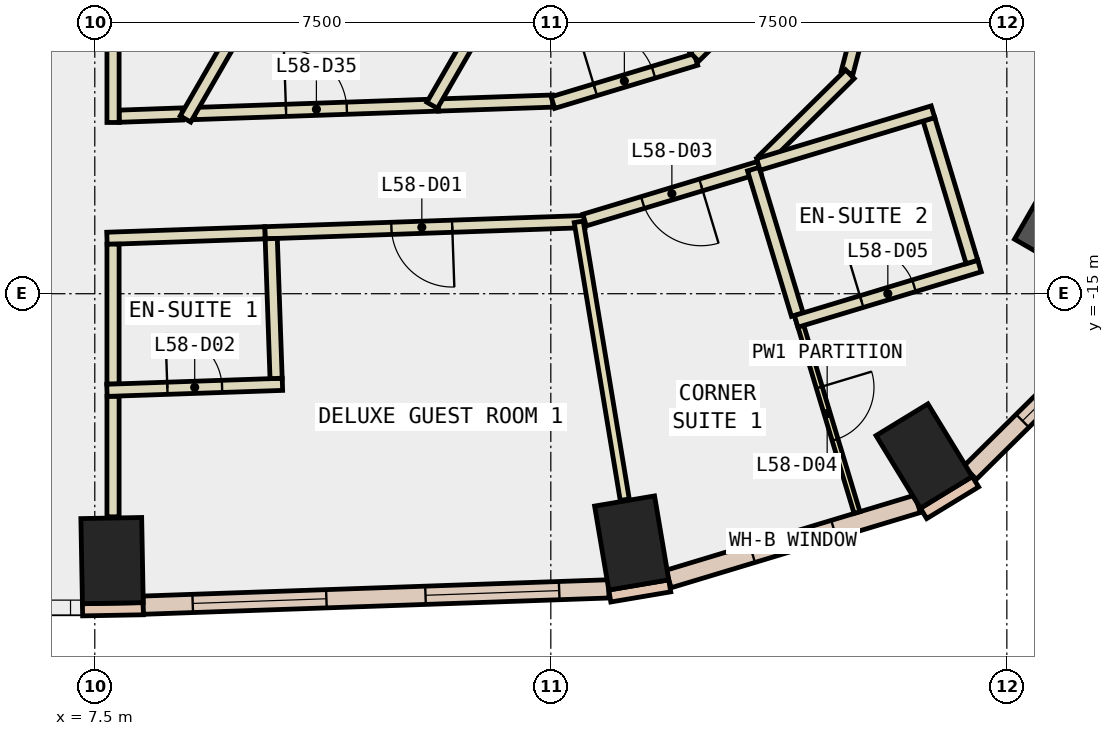
"""IFC4 building model, lengths in metres.
Left out: names, types, materials, properties, quantities, classifications, styles, units other than length and angle.
Written with IfcOpenShell. Run it as: python <this file> out.ifc"""

import sys

from ifc_helpers import new_model, si_unit, direction, frame, frame_2d, origin, origin_2d, place, context, subcontext, project, spatial, rectangle, extrude, element, fill, save


model = new_model("IFC4")
c1 = context("Model", 3, precision=1e-05, world=origin(), true_north=direction((0.0, 1.0)))
c2 = subcontext(c1, "Body", "Model", "MODEL_VIEW")
j1 = project(units=[si_unit("LENGTHUNIT", "METRE"), si_unit("PLANEANGLEUNIT", "RADIAN")], contexts=[c1])
p1 = place(None, origin())
s1 = spatial("IfcSite", under=j1, at=p1, CompositionType="ELEMENT")
p2 = place(p1, origin())
s2 = spatial("IfcBuilding", under=s1, at=p2, CompositionType="ELEMENT")
p3 = place(p2, frame((0.0, 0.0, 255.8)))
s3 = spatial("IfcBuildingStorey", under=s2, at=p3, CompositionType="ELEMENT", Elevation=255.8)
for number, where, z_axis, x_axis in (
    (1, (7.784, -19.389, -0.34), (0.0, 0.0, 1.0), (1.0, 0.018, 0.0)),
    (2, (16.33, -19.099, -0.34), (0.0, 0.0, 1.0), (0.986, 0.167, 0.0)),
    (3, (21.14, -17.67, -0.34), (0.0, 0.0, 1.0), (0.853, 0.521, 0.0)),
):
    element("IfcColumn", number, at=place(p3, frame(where, z_axis=z_axis, x_axis=x_axis)), inside=s3, PredefinedType="COLUMN", context=c2, shape_type="SweptSolid", body=[
        extrude(rectangle(XDim=1.0, YDim=1.4, at=origin_2d()), origin(), (0.0, 0.0, 1.0), 3.6),
    ])
p4 = place(p3, frame((23.856, -13.774, -0.34), z_axis=(0.0, 0.0, 1.0), x_axis=(-0.866025403784, 0.5, 0.0)))
e4 = element("IfcColumn", 4, at=p4, inside=s3, PredefinedType="COLUMN", context=c2, shape_type="SweptSolid", body=[
    extrude(rectangle(XDim=1.8, YDim=1.8, at=origin_2d()), origin(), (0.0, 0.0, 1.0), 3.6),
])
for number, where, z_axis, x_axis in (
    (5, (7.298, -20.198, 0.0), (0.0, 0.0, 1.0), (1.0, 0.018, 0.0)),
    (6, (15.97, -19.971, 0.0), (0.0, 0.0, 1.0), (0.986, 0.167, 0.0)),
):
    element("IfcWall", number, at=place(p3, frame(where, z_axis=z_axis, x_axis=x_axis)), inside=s3, PredefinedType="STANDARD", context=c2, shape_type="SweptSolid", body=[
        extrude(rectangle(XDim=1.0, YDim=0.2, at=frame_2d((0.5, 0.0))), origin(), (0.0, 0.0, 1.0), 3.26),
    ])
p5 = place(p3, frame((21.13, -18.613, 0.0), z_axis=(0.0, 0.0, 1.0), x_axis=(0.853679739553, 0.520798331677, 0.0)))
e7 = element("IfcWall", 7, at=p5, inside=s3, PredefinedType="STANDARD", context=c2, shape_type="SweptSolid", body=[
    extrude(rectangle(XDim=1.0, YDim=0.2, at=frame_2d((0.5, 0.0))), origin(), (0.0, 0.0, 1.0), 3.26),
])
p6 = place(p3, frame((8.296, -20.122, 0.0), z_axis=(0.0, 0.0, 1.0), x_axis=(0.999387577449, 0.034992428331, 0.0)))
e8 = element("IfcWall", 8, at=p6, inside=s3, PredefinedType="STANDARD", context=c2, shape_type="SweptSolid", body=[
    extrude(rectangle(XDim=7.661, YDim=0.3, at=frame_2d((3.83, 0.0))), origin(), (0.0, 0.0, 1.0), 3.26),
])
p7 = place(p6, frame((0.815, 0.0, 0.9)))
e9 = element("IfcOpeningElement", 9, at=p7, cuts=e8, PredefinedType="OPENING", context=c2, shape_type="SweptSolid", body=[
    extrude(rectangle(XDim=2.2, YDim=2.0, at=frame_2d((1.1, 1.0))), frame((0.0, 0.16, 0.0), z_axis=(0.0, -1.0, 0.0), x_axis=(1.0, 0.0, 0.0)), (0.0, 0.0, 1.0), 0.32),
])
p8 = place(p6, frame((4.646, 0.0, 0.9)))
e10 = element("IfcOpeningElement", 10, at=p8, cuts=e8, PredefinedType="OPENING", context=c2, shape_type="SweptSolid", body=[
    extrude(rectangle(XDim=2.2, YDim=2.0, at=frame_2d((1.1, 1.0))), frame((0.0, 0.16, 0.0), z_axis=(0.0, -1.0, 0.0), x_axis=(1.0, 0.0, 0.0)), (0.0, 0.0, 1.0), 0.32),
])
p9 = place(p3, frame((16.936, -19.692, 0.0), z_axis=(0.0, 0.0, 1.0), x_axis=(0.957346168713, 0.288943442997, 0.0)))
e11 = element("IfcWall", 11, at=p9, inside=s3, PredefinedType="STANDARD", context=c2, shape_type="SweptSolid", body=[
    extrude(rectangle(XDim=4.281, YDim=0.3, at=frame_2d((2.14, 0.0))), origin(), (0.0, 0.0, 1.0), 3.26),
])
p10 = place(p9, frame((1.44, 0.0, 0.9)))
e12 = element("IfcOpeningElement", 12, at=p10, cuts=e11, PredefinedType="OPENING", context=c2, shape_type="SweptSolid", body=[
    extrude(rectangle(XDim=1.4, YDim=2.0, at=frame_2d((0.7, 1.0))), frame((0.0, 0.16, 0.0), z_axis=(0.0, -1.0, 0.0), x_axis=(1.0, 0.0, 0.0)), (0.0, 0.0, 1.0), 0.32),
])
p11 = place(p3, frame((21.893, -17.946, 0.0), z_axis=(0.0, 0.0, 1.0), x_axis=(0.71110935557, 0.703081420904, 0.0)))
e13 = element("IfcWall", 13, at=p11, inside=s3, PredefinedType="STANDARD", context=c2, shape_type="SweptSolid", body=[
    extrude(rectangle(XDim=3.832, YDim=0.3, at=frame_2d((1.916, 0.0))), origin(), (0.0, 0.0, 1.0), 3.26),
])
p12 = place(p11, frame((1.216, 0.0, 0.9)))
e14 = element("IfcOpeningElement", 14, at=p12, cuts=e13, PredefinedType="OPENING", context=c2, shape_type="SweptSolid", body=[
    extrude(rectangle(XDim=1.4, YDim=2.0, at=frame_2d((0.7, 1.0))), frame((0.0, 0.16, 0.0), z_axis=(0.0, -1.0, 0.0), x_axis=(1.0, 0.0, 0.0)), (0.0, 0.0, 1.0), 0.32),
])
p13 = place(p3, frame((7.9, -12.081, 0.0), z_axis=(0.0, 0.0, 1.0), x_axis=(0.999365240621, 0.035624652105, 0.0)))
e15 = element("IfcWall", 15, at=p13, inside=s3, PredefinedType="PARTITIONING", context=c2, shape_type="SweptSolid", body=[
    extrude(rectangle(XDim=1.042, YDim=0.2, at=frame_2d((0.521, 0.0))), origin(), (0.0, 0.0, 1.0), 3.26),
])
p14 = place(p3, frame((9.141, -12.037, 0.0), z_axis=(0.0, 0.0, 1.0), x_axis=(0.999388955878, 0.034953038062, 0.0)))
e16 = element("IfcWall", 16, at=p14, inside=s3, PredefinedType="PARTITIONING", context=c2, shape_type="SweptSolid", body=[
    extrude(rectangle(XDim=4.009, YDim=0.2, at=frame_2d((2.005, 0.0))), origin(), (0.0, 0.0, 1.0), 3.26),
])
p15 = place(p14, frame((1.505, 0.0, 0.0)))
e17 = element("IfcOpeningElement", 17, at=p15, cuts=e16, PredefinedType="OPENING", context=c2, shape_type="SweptSolid", body=[
    extrude(rectangle(XDim=1.0, YDim=2.1, at=frame_2d((0.5, 1.05))), frame((0.0, 0.11, 0.0), z_axis=(0.0, -1.0, 0.0), x_axis=(1.0, 0.0, 0.0)), (0.0, 0.0, 1.0), 0.22),
])
p16 = place(p3, frame((13.148, -11.897, 0.0), z_axis=(0.0, 0.0, 1.0), x_axis=(0.999405229262, 0.034484601243, 0.0)))
e18 = element("IfcWall", 18, at=p16, inside=s3, PredefinedType="PARTITIONING", context=c2, shape_type="SweptSolid", body=[
    extrude(rectangle(XDim=1.883, YDim=0.2, at=frame_2d((0.942, 0.0))), origin(), (0.0, 0.0, 1.0), 3.26),
])
p17 = place(p3, frame((15.034, -11.857, 0.0), z_axis=(0.0, 0.0, 1.0), x_axis=(0.957338084933, 0.288970225346, 0.0)))
e19 = element("IfcWall", 19, at=p17, inside=s3, PredefinedType="PARTITIONING", context=c2, shape_type="SweptSolid", body=[
    extrude(rectangle(XDim=2.457, YDim=0.2, at=frame_2d((1.229, 0.0))), origin(), (0.0, 0.0, 1.0), 3.26),
])
p18 = place(p17, frame((0.728, 0.0, 0.0)))
e20 = element("IfcOpeningElement", 20, at=p18, cuts=e19, PredefinedType="OPENING", context=c2, shape_type="SweptSolid", body=[
    extrude(rectangle(XDim=1.0, YDim=2.1, at=frame_2d((0.5, 1.05))), frame((0.0, 0.11, 0.0), z_axis=(0.0, -1.0, 0.0), x_axis=(1.0, 0.0, 0.0)), (0.0, 0.0, 1.0), 0.22),
])
p19 = place(p3, frame((17.362, -11.106, 0.0), z_axis=(0.0, 0.0, 1.0), x_axis=(0.710859741153, 0.703333795866, 0.0)))
e21 = element("IfcWall", 21, at=p19, inside=s3, PredefinedType="PARTITIONING", context=c2, shape_type="SweptSolid", body=[
    extrude(rectangle(XDim=1.071, YDim=0.2, at=frame_2d((0.535, 0.0))), origin(), (0.0, 0.0, 1.0), 3.26),
])
p20 = place(p3, frame((15.559, -13.814, 0.0), z_axis=(0.0, 0.0, 1.0), x_axis=(-0.999388410674, -0.034968623214, 0.0)))
e22 = element("IfcWall", 22, at=p20, inside=s3, PredefinedType="PARTITIONING", context=c2, shape_type="SweptSolid", body=[
    extrude(rectangle(XDim=5.264, YDim=0.2, at=frame_2d((2.632, 0.0))), origin(), (0.0, 0.0, 1.0), 3.26),
])
p21 = place(p20, frame((2.182, 0.0, 0.0)))
e23 = element("IfcOpeningElement", 23, at=p21, cuts=e22, PredefinedType="OPENING", context=c2, shape_type="SweptSolid", body=[
    extrude(rectangle(XDim=1.0, YDim=2.1, at=frame_2d((0.5, 1.05))), frame((0.0, 0.11, 0.0), z_axis=(0.0, -1.0, 0.0), x_axis=(1.0, 0.0, 0.0)), (0.0, 0.0, 1.0), 0.22),
])
p22 = place(p3, frame((10.298, -13.998, 0.0), z_axis=(0.0, 0.0, 1.0), x_axis=(-0.999386321032, -0.035028293342, 0.0)))
e24 = element("IfcWall", 24, at=p22, inside=s3, PredefinedType="PARTITIONING", context=c2, shape_type="SweptSolid", body=[
    extrude(rectangle(XDim=2.6, YDim=0.2, at=frame_2d((1.3, 0.0))), origin(), (0.0, 0.0, 1.0), 3.26),
])
p23 = place(p3, frame((18.427, -12.922, 0.0), z_axis=(0.0, 0.0, 1.0), x_axis=(-0.957336631432, -0.288975040651, 0.0)))
e25 = element("IfcWall", 25, at=p23, inside=s3, PredefinedType="PARTITIONING", context=c2, shape_type="SweptSolid", body=[
    extrude(rectangle(XDim=3.0, YDim=0.2, at=frame_2d((1.5, 0.0))), origin(), (0.0, 0.0, 1.0), 3.26),
])
p24 = place(p23, frame((1.0, 0.0, 0.0)))
e26 = element("IfcOpeningElement", 26, at=p24, cuts=e25, PredefinedType="OPENING", context=c2, shape_type="SweptSolid", body=[
    extrude(rectangle(XDim=1.0, YDim=2.1, at=frame_2d((0.5, 1.05))), frame((0.0, 0.11, 0.0), z_axis=(0.0, -1.0, 0.0), x_axis=(1.0, 0.0, 0.0)), (0.0, 0.0, 1.0), 0.22),
])
p25 = place(p3, frame((20.327, -9.629, 0.0), z_axis=(0.0, 0.0, 1.0), x_axis=(-0.253192482031, -0.967415922467, 0.0)))
e27 = element("IfcWall", 27, at=p25, inside=s3, PredefinedType="PARTITIONING", context=c2, shape_type="SweptSolid", body=[
    extrude(rectangle(XDim=1.792, YDim=0.2, at=frame_2d((0.896, 0.0))), origin(), (0.0, 0.0, 1.0), 3.26),
])
p26 = place(p3, frame((19.919, -11.39, 0.0), z_axis=(0.0, 0.0, 1.0), x_axis=(-0.71104667794, -0.70314480855, 0.0)))
e28 = element("IfcWall", 28, at=p26, inside=s3, PredefinedType="PARTITIONING", context=c2, shape_type="SweptSolid", body=[
    extrude(rectangle(XDim=2.008, YDim=0.2, at=frame_2d((1.004, 0.0))), origin(), (0.0, 0.0, 1.0), 3.26),
])
p27 = place(p3, frame((7.8, -7.499, 0.0), z_axis=(0.0, 0.0, 1.0), x_axis=(0.0, -1.0, 0.0)))
e29 = element("IfcWall", 29, at=p27, inside=s3, PredefinedType="PARTITIONING", context=c2, shape_type="SweptSolid", body=[
    extrude(rectangle(XDim=4.685, YDim=0.2, at=frame_2d((2.343, 0.0))), origin(), (0.0, 0.0, 1.0), 3.26),
])
p28 = place(p27, frame((1.842, 0.0, 0.0)))
e30 = element("IfcOpeningElement", 30, at=p28, cuts=e29, PredefinedType="OPENING", context=c2, shape_type="SweptSolid", body=[
    extrude(rectangle(XDim=1.0, YDim=2.1, at=frame_2d((0.5, 1.05))), frame((0.0, 0.11, 0.0), z_axis=(0.0, -1.0, 0.0), x_axis=(1.0, 0.0, 0.0)), (0.0, 0.0, 1.0), 0.22),
])
p29 = place(p3, frame((7.8, -16.686, 0.0), z_axis=(0.0, 0.0, 1.0), x_axis=(0.0, -1.0, 0.0)))
e31 = element("IfcWall", 31, at=p29, inside=s3, PredefinedType="PARTITIONING", context=c2, shape_type="SweptSolid", body=[
    extrude(rectangle(XDim=1.983, YDim=0.2, at=frame_2d((0.991, 0.0))), origin(), (0.0, 0.0, 1.0), 3.26),
])
p30 = place(p3, frame((7.8, -14.185, 0.0), z_axis=(0.0, 0.0, 1.0), x_axis=(0.0, -1.0, 0.0)))
e32 = element("IfcWall", 32, at=p30, inside=s3, PredefinedType="PARTITIONING", context=c2, shape_type="SweptSolid", body=[
    extrude(rectangle(XDim=2.301, YDim=0.2, at=frame_2d((1.15, 0.0))), origin(), (0.0, 0.0, 1.0), 3.26),
])
p31 = place(p3, frame((11.794, -7.271, 0.0), z_axis=(0.0, 0.0, 1.0), x_axis=(-0.499918457185, -0.866072477433, 0.0)))
e33 = element("IfcWall", 33, at=p31, inside=s3, PredefinedType="PARTITIONING", context=c2, shape_type="SweptSolid", body=[
    extrude(rectangle(XDim=5.607, YDim=0.2, at=frame_2d((2.803, 0.0))), origin(), (0.0, 0.0, 1.0), 3.26),
])
p32 = place(p3, frame((14.739, -8.972, 0.0), z_axis=(0.0, 0.0, 1.0), x_axis=(-0.499974489635, -0.8660401317, 0.0)))
e34 = element("IfcWall", 34, at=p32, inside=s3, PredefinedType="PARTITIONING", context=c2, shape_type="SweptSolid", body=[
    extrude(rectangle(XDim=3.382, YDim=0.2, at=frame_2d((1.691, 0.0))), origin(), (0.0, 0.0, 1.0), 3.26),
])
p33 = place(p3, frame((7.7, -16.589, 0.0), z_axis=(0.0, 0.0, 1.0), x_axis=(0.999410709261, 0.034325416459, 0.0)))
e35 = element("IfcWall", 35, at=p33, inside=s3, PredefinedType="PARTITIONING", context=c2, shape_type="SweptSolid", body=[
    extrude(rectangle(XDim=2.888, YDim=0.2, at=frame_2d((1.444, 0.0))), origin(), (0.0, 0.0, 1.0), 3.26),
])
p34 = place(p33, frame((0.994, 0.0, 0.0)))
e36 = element("IfcOpeningElement", 36, at=p34, cuts=e35, PredefinedType="OPENING", context=c2, shape_type="SweptSolid", body=[
    extrude(rectangle(XDim=0.9, YDim=2.1, at=frame_2d((0.45, 1.05))), frame((0.0, 0.11, 0.0), z_axis=(0.0, -1.0, 0.0), x_axis=(1.0, 0.0, 0.0)), (0.0, 0.0, 1.0), 0.22),
])
p35 = place(p3, frame((10.482, -16.393, 0.0), z_axis=(0.0, 0.0, 1.0), x_axis=(-0.034703518322, 0.999397651496, 0.0)))
e37 = element("IfcWall", 37, at=p35, inside=s3, PredefinedType="PARTITIONING", context=c2, shape_type="SweptSolid", body=[
    extrude(rectangle(XDim=2.301, YDim=0.2, at=frame_2d((1.15, 0.0))), origin(), (0.0, 0.0, 1.0), 3.26),
])
p36 = place(p3, frame((15.459, -13.818, 0.0), z_axis=(0.0, 0.0, 1.0), x_axis=(0.163441652939, -0.986553002167, 0.0)))
e38 = element("IfcWall", 38, at=p36, inside=s3, PredefinedType="PARTITIONING", context=c2, shape_type="SweptSolid", body=[
    extrude(rectangle(XDim=4.632, YDim=0.15, at=frame_2d((2.316, 0.0))), origin(), (0.0, 0.0, 1.0), 3.26),
])
p37 = place(p3, frame((19.054, -15.344, 0.0), z_axis=(0.0, 0.0, 1.0), x_axis=(0.288803435252, -0.957388414274, 0.0)))
e39 = element("IfcWall", 39, at=p37, inside=s3, PredefinedType="PARTITIONING", context=c2, shape_type="SweptSolid", body=[
    extrude(rectangle(XDim=3.4, YDim=0.1, at=frame_2d((1.7, 0.0))), origin(), (0.0, 0.0, 1.0), 3.26),
])
p38 = place(p37, frame((1.25, 0.0, 0.0)))
e40 = element("IfcOpeningElement", 40, at=p38, cuts=e39, PredefinedType="OPENING", context=c2, shape_type="SweptSolid", body=[
    extrude(rectangle(XDim=0.9, YDim=2.1, at=frame_2d((0.45, 1.05))), frame((0.0, 0.06, 0.0), z_axis=(0.0, -1.0, 0.0), x_axis=(1.0, 0.0, 0.0)), (0.0, 0.0, 1.0), 0.12),
])
p39 = place(p3, frame((18.331, -12.951, 0.0), z_axis=(0.0, 0.0, 1.0), x_axis=(0.289175152117, -0.957276204341, 0.0)))
e41 = element("IfcWall", 41, at=p39, inside=s3, PredefinedType="PARTITIONING", context=c2, shape_type="SweptSolid", body=[
    extrude(rectangle(XDim=2.5, YDim=0.2, at=frame_2d((1.25, 0.0))), origin(), (0.0, 0.0, 1.0), 3.26),
])
p40 = place(p3, frame((19.035, -15.455, 0.0), z_axis=(0.0, 0.0, 1.0), x_axis=(0.957248369253, 0.28926728049, 0.0)))
e42 = element("IfcWall", 42, at=p40, inside=s3, PredefinedType="PARTITIONING", context=c2, shape_type="SweptSolid", body=[
    extrude(rectangle(XDim=3.15, YDim=0.2, at=frame_2d((1.575, 0.0))), origin(), (0.0, 0.0, 1.0), 3.26),
])
p41 = place(p40, frame((1.125, 0.0, 0.0)))
e43 = element("IfcOpeningElement", 43, at=p41, cuts=e42, PredefinedType="OPENING", context=c2, shape_type="SweptSolid", body=[
    extrude(rectangle(XDim=0.9, YDim=2.1, at=frame_2d((0.45, 1.05))), frame((0.0, 0.11, 0.0), z_axis=(0.0, -1.0, 0.0), x_axis=(1.0, 0.0, 0.0)), (0.0, 0.0, 1.0), 0.22),
])
p42 = place(p3, frame((21.926, -14.478, 0.0), z_axis=(0.0, 0.0, 1.0), x_axis=(-0.288928787246, 0.957350591947, 0.0)))
e44 = element("IfcWall", 44, at=p42, inside=s3, PredefinedType="PARTITIONING", context=c2, shape_type="SweptSolid", body=[
    extrude(rectangle(XDim=2.45, YDim=0.2, at=frame_2d((1.225, 0.0))), origin(), (0.0, 0.0, 1.0), 3.26),
])
p43 = place(p3, frame((21.285, -12.007, 0.0), z_axis=(0.0, 0.0, 1.0), x_axis=(-0.957329834998, -0.288997555392, 0.0)))
e45 = element("IfcWall", 45, at=p43, inside=s3, PredefinedType="PARTITIONING", context=c2, shape_type="SweptSolid", body=[
    extrude(rectangle(XDim=3.0, YDim=0.2, at=frame_2d((1.5, 0.0))), origin(), (0.0, 0.0, 1.0), 3.26),
])
p44 = place(p7, origin())
e46 = element("IfcWindow", 46, at=p44, inside=s3, PartitioningType="SINGLE_PANEL", PredefinedType="WINDOW", context=c2, shape_type="SweptSolid", body=[
    extrude(rectangle(XDim=2.2, YDim=2.0, at=frame_2d((1.1, 1.0))), frame((0.0, 0.03, 0.0), z_axis=(0.0, -1.0, 0.0), x_axis=(1.0, 0.0, 0.0)), (0.0, 0.0, 1.0), 0.06),
])
fill(e9, e46)
p45 = place(p8, origin())
e47 = element("IfcWindow", 47, at=p45, inside=s3, PartitioningType="SINGLE_PANEL", PredefinedType="WINDOW", context=c2, shape_type="SweptSolid", body=[
    extrude(rectangle(XDim=2.2, YDim=2.0, at=frame_2d((1.1, 1.0))), frame((0.0, 0.03, 0.0), z_axis=(0.0, -1.0, 0.0), x_axis=(1.0, 0.0, 0.0)), (0.0, 0.0, 1.0), 0.06),
])
fill(e10, e47)
p46 = place(p10, origin())
e48 = element("IfcWindow", 48, at=p46, inside=s3, PartitioningType="SINGLE_PANEL", PredefinedType="WINDOW", context=c2, shape_type="SweptSolid", body=[
    extrude(rectangle(XDim=1.4, YDim=2.0, at=frame_2d((0.7, 1.0))), frame((0.0, 0.03, 0.0), z_axis=(0.0, -1.0, 0.0), x_axis=(1.0, 0.0, 0.0)), (0.0, 0.0, 1.0), 0.06),
])
fill(e12, e48)
p47 = place(p12, origin())
e49 = element("IfcWindow", 49, at=p47, inside=s3, PartitioningType="SINGLE_PANEL", PredefinedType="WINDOW", context=c2, shape_type="SweptSolid", body=[
    extrude(rectangle(XDim=1.4, YDim=2.0, at=frame_2d((0.7, 1.0))), frame((0.0, 0.03, 0.0), z_axis=(0.0, -1.0, 0.0), x_axis=(1.0, 0.0, 0.0)), (0.0, 0.0, 1.0), 0.06),
])
fill(e14, e49)
p48 = place(p21, origin())
e50 = element("IfcDoor", 50, at=p48, inside=s3, OperationType="SINGLE_SWING_LEFT", PredefinedType="DOOR", context=c2, shape_type="SweptSolid", body=[
    extrude(rectangle(XDim=1.0, YDim=2.1, at=frame_2d((0.5, 1.05))), frame((0.0, 0.025, 0.0), z_axis=(0.0, -1.0, 0.0), x_axis=(1.0, 0.0, 0.0)), (0.0, 0.0, 1.0), 0.05),
])
fill(e23, e50)
p49 = place(p34, origin())
e51 = element("IfcDoor", 51, at=p49, inside=s3, OperationType="SINGLE_SWING_LEFT", PredefinedType="DOOR", context=c2, shape_type="SweptSolid", body=[
    extrude(rectangle(XDim=0.9, YDim=2.1, at=frame_2d((0.45, 1.05))), frame((0.0, 0.025, 0.0), z_axis=(0.0, -1.0, 0.0), x_axis=(1.0, 0.0, 0.0)), (0.0, 0.0, 1.0), 0.05),
])
fill(e36, e51)
p50 = place(p24, origin())
e52 = element("IfcDoor", 52, at=p50, inside=s3, OperationType="SINGLE_SWING_LEFT", PredefinedType="DOOR", context=c2, shape_type="SweptSolid", body=[
    extrude(rectangle(XDim=1.0, YDim=2.1, at=frame_2d((0.5, 1.05))), frame((0.0, 0.025, 0.0), z_axis=(0.0, -1.0, 0.0), x_axis=(1.0, 0.0, 0.0)), (0.0, 0.0, 1.0), 0.05),
])
fill(e26, e52)
p51 = place(p38, origin())
e53 = element("IfcDoor", 53, at=p51, inside=s3, OperationType="SINGLE_SWING_RIGHT", PredefinedType="DOOR", context=c2, shape_type="SweptSolid", body=[
    extrude(rectangle(XDim=0.9, YDim=2.1, at=frame_2d((0.45, 1.05))), frame((0.0, 0.025, 0.0), z_axis=(0.0, -1.0, 0.0), x_axis=(1.0, 0.0, 0.0)), (0.0, 0.0, 1.0), 0.05),
])
fill(e40, e53)
p52 = place(p41, origin())
e54 = element("IfcDoor", 54, at=p52, inside=s3, OperationType="SINGLE_SWING_LEFT", PredefinedType="DOOR", context=c2, shape_type="SweptSolid", body=[
    extrude(rectangle(XDim=0.9, YDim=2.1, at=frame_2d((0.45, 1.05))), frame((0.0, 0.025, 0.0), z_axis=(0.0, -1.0, 0.0), x_axis=(1.0, 0.0, 0.0)), (0.0, 0.0, 1.0), 0.05),
])
fill(e43, e54)
p53 = place(p15, origin())
e55 = element("IfcDoor", 55, at=p53, inside=s3, OperationType="SINGLE_SWING_LEFT", PredefinedType="DOOR", context=c2, shape_type="SweptSolid", body=[
    extrude(rectangle(XDim=1.0, YDim=2.1, at=frame_2d((0.5, 1.05))), frame((0.0, 0.025, 0.0), z_axis=(0.0, -1.0, 0.0), x_axis=(1.0, 0.0, 0.0)), (0.0, 0.0, 1.0), 0.05),
])
fill(e17, e55)
p54 = place(p18, origin())
e56 = element("IfcDoor", 56, at=p54, inside=s3, OperationType="SINGLE_SWING_LEFT", PredefinedType="DOOR", context=c2, shape_type="SweptSolid", body=[
    extrude(rectangle(XDim=1.0, YDim=2.1, at=frame_2d((0.5, 1.05))), frame((0.0, 0.025, 0.0), z_axis=(0.0, -1.0, 0.0), x_axis=(1.0, 0.0, 0.0)), (0.0, 0.0, 1.0), 0.05),
])
fill(e20, e56)
save(model, sys.argv[1])
